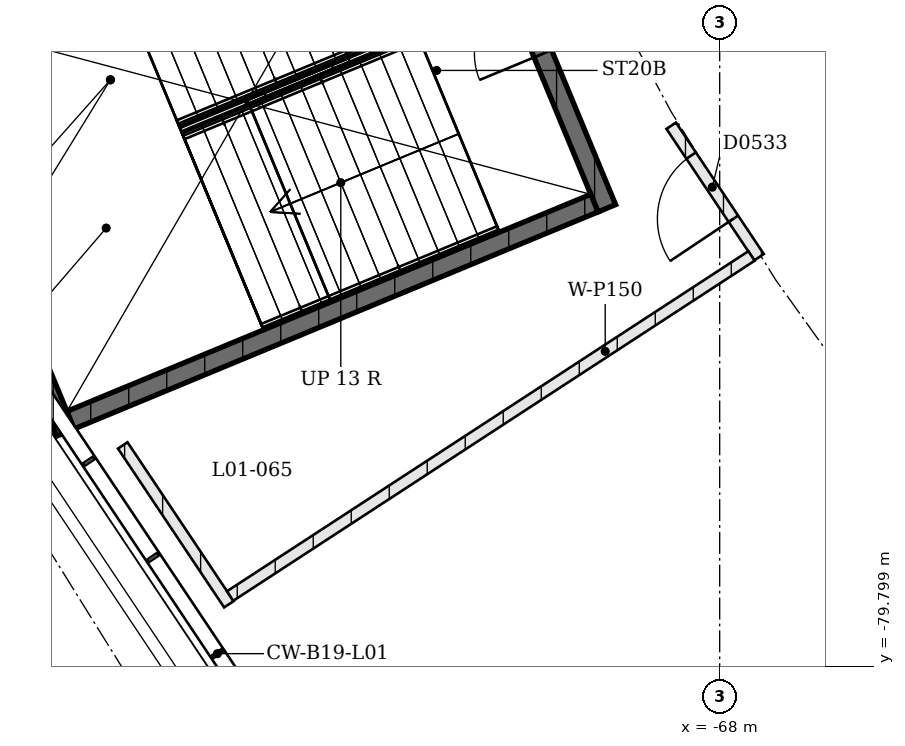
"""IFC4 building model, lengths in metres.
Left out: names, types, materials, properties, quantities, classifications, styles, units other than length and angle.
Written with IfcOpenShell. Run it as: python <this file> out.ifc"""

import sys

from ifc_helpers import new_model, si_unit, direction, frame, frame_2d, origin, place, context, subcontext, project, spatial, rectangle, extrude, element, fill, save


model = new_model("IFC4")
c1 = context("Model", 3, precision=1e-05, world=origin(), true_north=direction((0.0, 1.0)))
c2 = subcontext(c1, "Body", "Model", "MODEL_VIEW")
j1 = project(units=[si_unit("LENGTHUNIT", "METRE"), si_unit("PLANEANGLEUNIT", "RADIAN")], contexts=[c1])
p1 = place(None, origin())
s1 = spatial("IfcSite", under=j1, at=p1, CompositionType="ELEMENT")
p2 = place(p1, origin())
s2 = spatial("IfcBuilding", under=s1, at=p2, CompositionType="ELEMENT")
p3 = place(p2, frame((0.0, 0.0, 4.5)))
s3 = spatial("IfcBuildingStorey", under=s2, at=p3, CompositionType="ELEMENT", Elevation=4.5)
p4 = place(p3, frame((-74.135, -62.549, 0.0), z_axis=(0.0, 0.0, 1.0), x_axis=(0.382688386133, -0.923877480578, 0.0)))
e1 = element("IfcWall", 1, at=p4, inside=s3, PredefinedType="SHEAR", context=c2, shape_type="SweptSolid", body=[
    extrude(rectangle(XDim=12.15, YDim=0.25, at=frame_2d((6.075, 0.0))), origin(), (0.0, 0.0, 1.0), 4.09),
])
p5 = place(p4, frame((2.2, 0.0, 0.0)))
e2 = element("IfcOpeningElement", 2, at=p5, cuts=e1, PredefinedType="OPENING", context=c2, shape_type="SweptSolid", body=[
    extrude(rectangle(XDim=1.8, YDim=2.1, at=frame_2d((0.9, 1.05))), frame((0.0, 0.125, 0.0), z_axis=(0.0, -1.0, 0.0), x_axis=(1.0, 0.0, 0.0)), (0.0, 0.0, 1.0), 0.25),
])
p6 = place(p4, frame((8.15, 0.0, 0.0)))
e3 = element("IfcOpeningElement", 3, at=p6, cuts=e1, PredefinedType="OPENING", context=c2, shape_type="SweptSolid", body=[
    extrude(rectangle(XDim=1.8, YDim=2.1, at=frame_2d((0.9, 1.05))), frame((0.0, 0.125, 0.0), z_axis=(0.0, -1.0, 0.0), x_axis=(1.0, 0.0, 0.0)), (0.0, 0.0, 1.0), 0.25),
])
p7 = place(p3, frame((-81.258, -65.499, 0.0), z_axis=(0.0, 0.0, 1.0), x_axis=(0.382671234792, -0.923884584817, 0.0)))
e4 = element("IfcWall", 4, at=p7, inside=s3, PredefinedType="SHEAR", context=c2, shape_type="SweptSolid", body=[
    extrude(rectangle(XDim=12.15, YDim=0.25, at=frame_2d((6.075, 0.0))), origin(), (0.0, 0.0, 1.0), 4.09),
])
p8 = place(p3, frame((-69.648, -73.706, 0.0), z_axis=(0.0, 0.0, 1.0), x_axis=(-0.923887204407, -0.382664910245, 0.0)))
e5 = element("IfcWall", 5, at=p8, inside=s3, PredefinedType="SHEAR", context=c2, shape_type="SweptSolid", body=[
    extrude(rectangle(XDim=7.46, YDim=0.25, at=frame_2d((3.73, 0.0))), origin(), (0.0, 0.0, 1.0), 4.09),
])
p9 = place(p3, frame((-68.638, -72.688, 0.0), z_axis=(0.0, 0.0, 1.0), x_axis=(0.555620744921, -0.831435859109, 0.0)))
e6 = element("IfcWall", 6, at=p9, inside=s3, PredefinedType="PARTITIONING", context=c2, shape_type="SweptSolid", body=[
    extrude(rectangle(XDim=2.08, YDim=0.15, at=frame_2d((1.04, 0.0))), origin(), (0.0, 0.0, 1.0), 3.0),
])
p10 = place(p9, frame((0.472, 0.0, 0.0)))
e7 = element("IfcOpeningElement", 7, at=p10, cuts=e6, PredefinedType="OPENING", context=c2, shape_type="SweptSolid", body=[
    extrude(rectangle(XDim=1.0, YDim=2.1, at=frame_2d((0.5, 1.05))), frame((0.0, 0.075, 0.0), z_axis=(0.0, -1.0, 0.0), x_axis=(1.0, 0.0, 0.0)), (0.0, 0.0, 1.0), 0.15),
])
p11 = place(p3, frame((-75.854, -76.894, 0.0), z_axis=(0.0, 0.0, 1.0), x_axis=(0.555596479569, -0.83145207432, 0.0)))
e8 = element("IfcWall", 8, at=p11, inside=s3, PredefinedType="PARTITIONING", context=c2, shape_type="SweptSolid", body=[
    extrude(rectangle(XDim=2.513, YDim=0.15, at=frame_2d((1.257, 0.0))), origin(), (0.0, 0.0, 1.0), 3.0),
])
p12 = place(p3, frame((-67.581, -74.402, 0.0), z_axis=(0.0, 0.0, 1.0), x_axis=(-0.837607631618, -0.546272327191, 0.0)))
e9 = element("IfcWall", 9, at=p12, inside=s3, PredefinedType="PARTITIONING", context=c2, shape_type="SweptSolid", body=[
    extrude(rectangle(XDim=8.19, YDim=0.15, at=frame_2d((4.095, 0.0))), origin(), (0.0, 0.0, 1.0), 3.0),
])
p13 = place(p6, origin())
e10 = element("IfcDoor", 10, at=p13, inside=s3, OperationType="DOUBLE_DOOR_SINGLE_SWING", PredefinedType="DOOR", context=c2, shape_type="SweptSolid", body=[
    extrude(rectangle(XDim=1.8, YDim=2.1, at=frame_2d((0.9, 1.05))), frame((0.0, 0.025, 0.0), z_axis=(0.0, -1.0, 0.0), x_axis=(1.0, 0.0, 0.0)), (0.0, 0.0, 1.0), 0.05),
])
fill(e3, e10)
p14 = place(p10, origin())
e11 = element("IfcDoor", 11, at=p14, inside=s3, OperationType="SINGLE_SWING_RIGHT", PredefinedType="DOOR", context=c2, shape_type="SweptSolid", body=[
    extrude(rectangle(XDim=1.0, YDim=2.1, at=frame_2d((0.5, 1.05))), frame((0.0, 0.025, 0.0), z_axis=(0.0, -1.0, 0.0), x_axis=(1.0, 0.0, 0.0)), (0.0, 0.0, 1.0), 0.05),
])
fill(e7, e11)
save(model, sys.argv[1])
